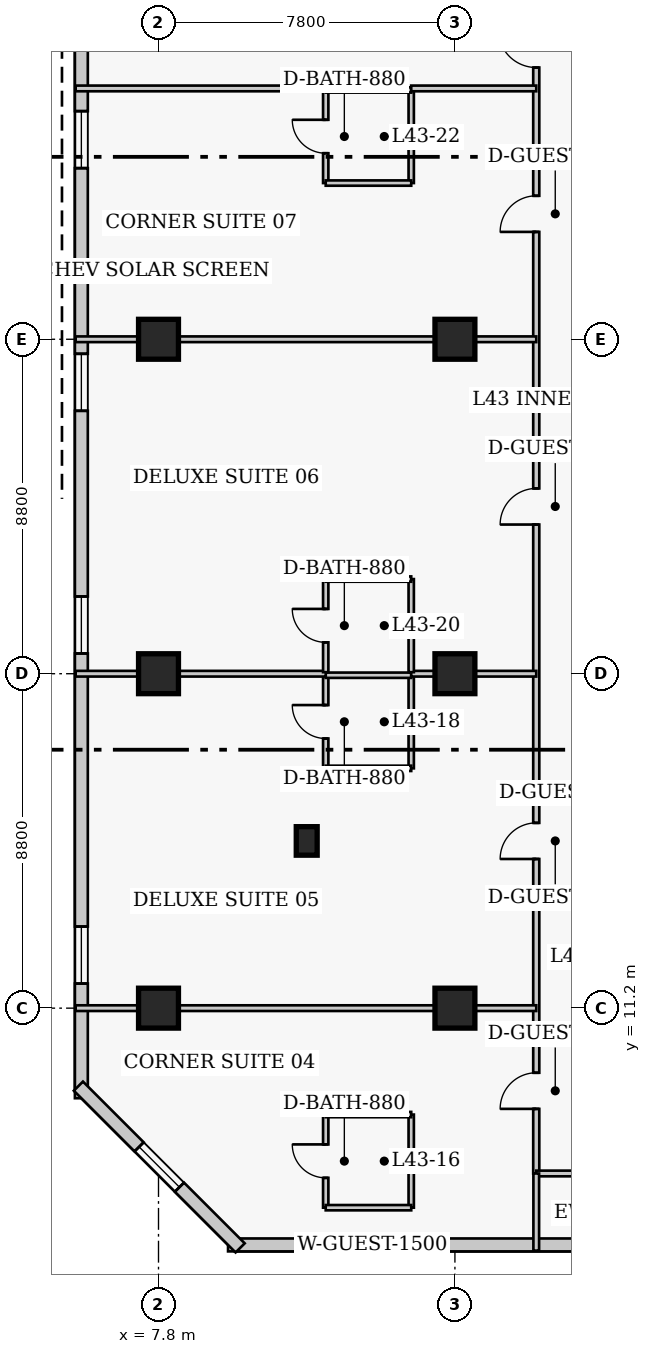
"""IFC4 building model, lengths in metres.
Left out: names, types, materials, properties, quantities, classifications, styles, units other than length and angle.
Written with IfcOpenShell. Run it as: python <this file> out.ifc"""

import sys

from ifc_helpers import new_model, si_unit, direction, frame, frame_2d, origin, origin_2d, place, context, subcontext, project, spatial, rectangle, extrude, element, fill, save


model = new_model("IFC4")
c1 = context("Model", 3, precision=1e-05, world=origin(), true_north=direction((0.0, 1.0)))
c2 = subcontext(c1, "Body", "Model", "MODEL_VIEW")
j1 = project(units=[si_unit("LENGTHUNIT", "METRE"), si_unit("PLANEANGLEUNIT", "RADIAN")], contexts=[c1])
p1 = place(None, origin())
s1 = spatial("IfcSite", under=j1, at=p1, CompositionType="ELEMENT")
p2 = place(p1, origin())
s2 = spatial("IfcBuilding", under=s1, at=p2, CompositionType="ELEMENT")
p3 = place(p2, frame((0.0, 0.0, 172.6)))
s3 = spatial("IfcBuildingStorey", under=s2, at=p3, CompositionType="ELEMENT", Elevation=172.6)
for number, where, z_axis, x_axis in (
    (1, (7.8, 11.2, 0.0), (0.0, 0.0, 1.0), (1.0, 0.0, 0.0)),
    (2, (7.8, 20.0, 0.0), (0.0, 0.0, 1.0), (1.0, 0.0, 0.0)),
    (3, (7.8, 28.8, 0.0), (0.0, 0.0, 1.0), (1.0, 0.0, 0.0)),
    (4, (15.6, 11.2, 0.0), (0.0, 0.0, 1.0), (1.0, 0.0, 0.0)),
    (5, (15.6, 20.0, 0.0), (0.0, 0.0, 1.0), (1.0, 0.0, 0.0)),
    (6, (15.6, 28.8, 0.0), (0.0, 0.0, 1.0), (1.0, 0.0, 0.0)),
):
    element("IfcColumn", number, at=place(p3, frame(where, z_axis=z_axis, x_axis=x_axis)), inside=s3, PredefinedType="COLUMN", context=c2, shape_type="SweptSolid", body=[
        extrude(rectangle(XDim=1.05, YDim=1.05, at=origin_2d()), origin(), (0.0, 0.0, 1.0), 3.8),
    ])
p4 = place(p3, frame((11.7, 15.6, 0.0), z_axis=(0.0, 0.0, 1.0), x_axis=(1.0, 0.0, 0.0)))
e7 = element("IfcColumn", 7, at=p4, inside=s3, PredefinedType="PILASTER", context=c2, shape_type="SweptSolid", body=[
    extrude(rectangle(XDim=0.55, YDim=0.75, at=origin_2d()), origin(), (0.0, 0.0, 1.0), 3.8),
])
p5 = place(p3, frame((9.63, 4.97, 0.0), z_axis=(0.0, 0.0, 1.0), x_axis=(1.0, 0.0, 0.0)))
e8 = element("IfcWall", 8, at=p5, inside=s3, PredefinedType="SOLIDWALL", context=c2, shape_type="SweptSolid", body=[
    extrude(rectangle(XDim=26.69, YDim=0.34, at=frame_2d((13.345, 0.0))), origin(), (0.0, 0.0, 1.0), 3.55),
])
p6 = place(p5, frame((3.048, 0.0, 0.85)))
e9 = element("IfcOpeningElement", 9, at=p6, cuts=e8, PredefinedType="OPENING", context=c2, shape_type="SweptSolid", body=[
    extrude(rectangle(XDim=1.5, YDim=1.75, at=frame_2d((0.75, 0.875))), frame((0.0, 0.18, 0.0), z_axis=(0.0, -1.0, 0.0), x_axis=(1.0, 0.0, 0.0)), (0.0, 0.0, 1.0), 0.36),
])
p7 = place(p5, frame((22.642, 0.0, 0.85)))
e10 = element("IfcOpeningElement", 10, at=p7, cuts=e8, PredefinedType="OPENING", context=c2, shape_type="SweptSolid", body=[
    extrude(rectangle(XDim=1.5, YDim=1.75, at=frame_2d((0.75, 0.875))), frame((0.0, 0.18, 0.0), z_axis=(0.0, -1.0, 0.0), x_axis=(1.0, 0.0, 0.0)), (0.0, 0.0, 1.0), 0.36),
])
p8 = place(p5, frame((16.27, 0.0, 0.0)))
e11 = element("IfcOpeningElement", 11, at=p8, cuts=e8, PredefinedType="OPENING", context=c2, shape_type="SweptSolid", body=[
    extrude(rectangle(XDim=1.2, YDim=2.1, at=frame_2d((0.6, 1.05))), frame((0.0, 0.18, 0.0), z_axis=(0.0, -1.0, 0.0), x_axis=(1.0, 0.0, 0.0)), (0.0, 0.0, 1.0), 0.36),
])
p9 = place(p3, frame((5.77, 38.97, 0.0), z_axis=(0.0, 0.0, 1.0), x_axis=(0.0, -1.0, 0.0)))
e12 = element("IfcWall", 12, at=p9, inside=s3, PredefinedType="SOLIDWALL", context=c2, shape_type="SweptSolid", body=[
    extrude(rectangle(XDim=30.14, YDim=0.34, at=frame_2d((15.07, 0.0))), origin(), (0.0, 0.0, 1.0), 3.55),
])
p10 = place(p9, frame((4.167, 0.0, 0.85)))
e13 = element("IfcOpeningElement", 13, at=p10, cuts=e12, PredefinedType="OPENING", context=c2, shape_type="SweptSolid", body=[
    extrude(rectangle(XDim=1.5, YDim=1.75, at=frame_2d((0.75, 0.875))), frame((0.0, 0.18, 0.0), z_axis=(0.0, -1.0, 0.0), x_axis=(1.0, 0.0, 0.0)), (0.0, 0.0, 1.0), 0.36),
])
p11 = place(p9, frame((10.552, 0.0, 0.85)))
e14 = element("IfcOpeningElement", 14, at=p11, cuts=e12, PredefinedType="OPENING", context=c2, shape_type="SweptSolid", body=[
    extrude(rectangle(XDim=1.5, YDim=1.75, at=frame_2d((0.75, 0.875))), frame((0.0, 0.18, 0.0), z_axis=(0.0, -1.0, 0.0), x_axis=(1.0, 0.0, 0.0)), (0.0, 0.0, 1.0), 0.36),
])
p12 = place(p9, frame((16.938, 0.0, 0.85)))
e15 = element("IfcOpeningElement", 15, at=p12, cuts=e12, PredefinedType="OPENING", context=c2, shape_type="SweptSolid", body=[
    extrude(rectangle(XDim=1.5, YDim=1.75, at=frame_2d((0.75, 0.875))), frame((0.0, 0.18, 0.0), z_axis=(0.0, -1.0, 0.0), x_axis=(1.0, 0.0, 0.0)), (0.0, 0.0, 1.0), 0.36),
])
p13 = place(p9, frame((25.623, 0.0, 0.85)))
e16 = element("IfcOpeningElement", 16, at=p13, cuts=e12, PredefinedType="OPENING", context=c2, shape_type="SweptSolid", body=[
    extrude(rectangle(XDim=1.5, YDim=1.75, at=frame_2d((0.75, 0.875))), frame((0.0, 0.18, 0.0), z_axis=(0.0, -1.0, 0.0), x_axis=(1.0, 0.0, 0.0)), (0.0, 0.0, 1.0), 0.36),
])
p14 = place(p3, frame((5.692, 9.148, 0.0), z_axis=(0.0, 0.0, 1.0), x_axis=(0.707106781187, -0.707106781187, 0.0)))
e17 = element("IfcWall", 17, at=p14, inside=s3, PredefinedType="SOLIDWALL", context=c2, shape_type="SweptSolid", body=[
    extrude(rectangle(XDim=6.02, YDim=0.34, at=frame_2d((3.01, 0.0))), origin(), (0.0, 0.0, 1.0), 3.55),
])
p15 = place(p14, frame((2.26, 0.0, 0.85)))
e18 = element("IfcOpeningElement", 18, at=p15, cuts=e17, PredefinedType="OPENING", context=c2, shape_type="SweptSolid", body=[
    extrude(rectangle(XDim=1.5, YDim=1.75, at=frame_2d((0.75, 0.875))), frame((0.0, 0.18, 0.0), z_axis=(0.0, -1.0, 0.0), x_axis=(1.0, 0.0, 0.0)), (0.0, 0.0, 1.0), 0.36),
])
p16 = place(p3, frame((17.74, 6.85, 0.0), z_axis=(0.0, 0.0, 1.0), x_axis=(0.0, 1.0, 0.0)))
e19 = element("IfcWall", 19, at=p16, inside=s3, PredefinedType="PARTITIONING", context=c2, shape_type="SweptSolid", body=[
    extrude(rectangle(XDim=33.8, YDim=0.16, at=frame_2d((16.9, 0.0))), origin(), (0.0, 0.0, 1.0), 3.55),
])
p17 = place(p16, frame((1.7, 0.0, 0.0)))
e20 = element("IfcOpeningElement", 20, at=p17, cuts=e19, PredefinedType="OPENING", context=c2, shape_type="SweptSolid", body=[
    extrude(rectangle(XDim=0.95, YDim=2.1, at=frame_2d((0.475, 1.05))), frame((0.0, 0.09, 0.0), z_axis=(0.0, -1.0, 0.0), x_axis=(1.0, 0.0, 0.0)), (0.0, 0.0, 1.0), 0.18),
])
p18 = place(p16, frame((8.275, 0.0, 0.0)))
e21 = element("IfcOpeningElement", 21, at=p18, cuts=e19, PredefinedType="OPENING", context=c2, shape_type="SweptSolid", body=[
    extrude(rectangle(XDim=0.95, YDim=2.1, at=frame_2d((0.475, 1.05))), frame((0.0, 0.09, 0.0), z_axis=(0.0, -1.0, 0.0), x_axis=(1.0, 0.0, 0.0)), (0.0, 0.0, 1.0), 0.18),
])
p19 = place(p16, frame((17.075, 0.0, 0.0)))
e22 = element("IfcOpeningElement", 22, at=p19, cuts=e19, PredefinedType="OPENING", context=c2, shape_type="SweptSolid", body=[
    extrude(rectangle(XDim=0.95, YDim=2.1, at=frame_2d((0.475, 1.05))), frame((0.0, 0.09, 0.0), z_axis=(0.0, -1.0, 0.0), x_axis=(1.0, 0.0, 0.0)), (0.0, 0.0, 1.0), 0.18),
])
p20 = place(p16, frame((24.775, 0.0, 0.0)))
e23 = element("IfcOpeningElement", 23, at=p20, cuts=e19, PredefinedType="OPENING", context=c2, shape_type="SweptSolid", body=[
    extrude(rectangle(XDim=0.95, YDim=2.1, at=frame_2d((0.475, 1.05))), frame((0.0, 0.09, 0.0), z_axis=(0.0, -1.0, 0.0), x_axis=(1.0, 0.0, 0.0)), (0.0, 0.0, 1.0), 0.18),
])
p21 = place(p16, frame((29.1, 0.0, 0.0)))
e24 = element("IfcOpeningElement", 24, at=p21, cuts=e19, PredefinedType="OPENING", context=c2, shape_type="SweptSolid", body=[
    extrude(rectangle(XDim=1.0, YDim=2.15, at=frame_2d((0.5, 1.075))), frame((0.0, 0.09, 0.0), z_axis=(0.0, -1.0, 0.0), x_axis=(1.0, 0.0, 0.0)), (0.0, 0.0, 1.0), 0.18),
])
p22 = place(p3, frame((17.74, 6.85, 0.0), z_axis=(0.0, 0.0, 1.0), x_axis=(1.0, 0.0, 0.0)))
e25 = element("IfcWall", 25, at=p22, inside=s3, PredefinedType="PARTITIONING", context=c2, shape_type="SweptSolid", body=[
    extrude(rectangle(XDim=2.22, YDim=0.15, at=frame_2d((1.11, 0.0))), origin(), (0.0, 0.0, 1.0), 3.55),
])
p23 = place(p3, frame((17.74, 4.82, 0.0), z_axis=(0.0, 0.0, 1.0), x_axis=(0.0, 1.0, 0.0)))
e26 = element("IfcWall", 26, at=p23, inside=s3, PredefinedType="PARTITIONING", context=c2, shape_type="SweptSolid", body=[
    extrude(rectangle(XDim=2.03, YDim=0.15, at=frame_2d((1.015, 0.0))), origin(), (0.0, 0.0, 1.0), 3.55),
])
p24 = place(p3, frame((12.2, 5.95, 0.0), z_axis=(0.0, 0.0, 1.0), x_axis=(0.0, 1.0, 0.0)))
e27 = element("IfcWall", 27, at=p24, inside=s3, PredefinedType="PLUMBINGWALL", context=c2, shape_type="SweptSolid", body=[
    extrude(rectangle(XDim=2.45, YDim=0.14, at=frame_2d((1.225, 0.0))), origin(), (0.0, 0.0, 1.0), 3.55),
])
p25 = place(p24, frame((0.785, 0.0, 0.0)))
e28 = element("IfcOpeningElement", 28, at=p25, cuts=e27, PredefinedType="OPENING", context=c2, shape_type="SweptSolid", body=[
    extrude(rectangle(XDim=0.88, YDim=2.05, at=frame_2d((0.44, 1.025))), frame((0.0, 0.08, 0.0), z_axis=(0.0, -1.0, 0.0), x_axis=(1.0, 0.0, 0.0)), (0.0, 0.0, 1.0), 0.16),
])
p26 = place(p3, frame((14.45, 5.95, 0.0), z_axis=(0.0, 0.0, 1.0), x_axis=(0.0, 1.0, 0.0)))
e29 = element("IfcWall", 29, at=p26, inside=s3, PredefinedType="PLUMBINGWALL", context=c2, shape_type="SweptSolid", body=[
    extrude(rectangle(XDim=2.45, YDim=0.14, at=frame_2d((1.225, 0.0))), origin(), (0.0, 0.0, 1.0), 3.55),
])
for number, where, z_axis, x_axis in (
    (30, (12.2, 5.95, 0.0), (0.0, 0.0, 1.0), (1.0, 0.0, 0.0)),
    (31, (12.2, 8.4, 0.0), (0.0, 0.0, 1.0), (1.0, 0.0, 0.0)),
):
    element("IfcWall", number, at=place(p3, frame(where, z_axis=z_axis, x_axis=x_axis)), inside=s3, PredefinedType="PLUMBINGWALL", context=c2, shape_type="SweptSolid", body=[
        extrude(rectangle(XDim=2.25, YDim=0.14, at=frame_2d((1.125, 0.0))), origin(), (0.0, 0.0, 1.0), 3.55),
    ])
p27 = place(p3, frame((5.62, 11.2, 0.0), z_axis=(0.0, 0.0, 1.0), x_axis=(1.0, 0.0, 0.0)))
e32 = element("IfcWall", 32, at=p27, inside=s3, PredefinedType="PARTITIONING", context=c2, shape_type="SweptSolid", body=[
    extrude(rectangle(XDim=12.12, YDim=0.15, at=frame_2d((6.06, 0.0))), origin(), (0.0, 0.0, 1.0), 2.778),
])
p28 = place(p3, frame((12.2, 17.51, 0.0), z_axis=(0.0, 0.0, 1.0), x_axis=(0.0, 1.0, 0.0)))
e33 = element("IfcWall", 33, at=p28, inside=s3, PredefinedType="PLUMBINGWALL", context=c2, shape_type="SweptSolid", body=[
    extrude(rectangle(XDim=2.45, YDim=0.14, at=frame_2d((1.225, 0.0))), origin(), (0.0, 0.0, 1.0), 3.55),
])
p29 = place(p28, frame((0.785, 0.0, 0.0)))
e34 = element("IfcOpeningElement", 34, at=p29, cuts=e33, PredefinedType="OPENING", context=c2, shape_type="SweptSolid", body=[
    extrude(rectangle(XDim=0.88, YDim=2.05, at=frame_2d((0.44, 1.025))), frame((0.0, 0.08, 0.0), z_axis=(0.0, -1.0, 0.0), x_axis=(1.0, 0.0, 0.0)), (0.0, 0.0, 1.0), 0.16),
])
p30 = place(p3, frame((14.45, 17.51, 0.0), z_axis=(0.0, 0.0, 1.0), x_axis=(0.0, 1.0, 0.0)))
e35 = element("IfcWall", 35, at=p30, inside=s3, PredefinedType="PLUMBINGWALL", context=c2, shape_type="SweptSolid", body=[
    extrude(rectangle(XDim=2.45, YDim=0.14, at=frame_2d((1.225, 0.0))), origin(), (0.0, 0.0, 1.0), 3.55),
])
p31 = place(p3, frame((12.2, 17.51, 0.0), z_axis=(0.0, 0.0, 1.0), x_axis=(1.0, 0.0, 0.0)))
e36 = element("IfcWall", 36, at=p31, inside=s3, PredefinedType="PLUMBINGWALL", context=c2, shape_type="SweptSolid", body=[
    extrude(rectangle(XDim=2.25, YDim=0.14, at=frame_2d((1.125, 0.0))), origin(), (0.0, 0.0, 1.0), 3.55),
])
p32 = place(p3, frame((12.2, 19.96, 0.0), z_axis=(0.0, 0.0, 1.0), x_axis=(1.0, 0.0, 0.0)))
e37 = element("IfcWall", 37, at=p32, inside=s3, PredefinedType="PLUMBINGWALL", context=c2, shape_type="SweptSolid", body=[
    extrude(rectangle(XDim=2.25, YDim=0.14, at=frame_2d((1.125, 0.0))), origin(), (0.0, 0.0, 1.0), 2.9),
])
p33 = place(p3, frame((5.62, 20.0, 0.0), z_axis=(0.0, 0.0, 1.0), x_axis=(1.0, 0.0, 0.0)))
e38 = element("IfcWall", 38, at=p33, inside=s3, PredefinedType="PARTITIONING", context=c2, shape_type="SweptSolid", body=[
    extrude(rectangle(XDim=6.58, YDim=0.15, at=frame_2d((3.29, 0.0))), origin(), (0.0, 0.0, 1.0), 2.778),
])
p34 = place(p3, frame((14.45, 20.0, 0.0), z_axis=(0.0, 0.0, 1.0), x_axis=(1.0, 0.0, 0.0)))
e39 = element("IfcWall", 39, at=p34, inside=s3, PredefinedType="PARTITIONING", context=c2, shape_type="SweptSolid", body=[
    extrude(rectangle(XDim=3.29, YDim=0.15, at=frame_2d((1.645, 0.0))), origin(), (0.0, 0.0, 1.0), 2.778),
])
p35 = place(p3, frame((12.2, 20.04, 0.0), z_axis=(0.0, 0.0, 1.0), x_axis=(0.0, 1.0, 0.0)))
e40 = element("IfcWall", 40, at=p35, inside=s3, PredefinedType="PLUMBINGWALL", context=c2, shape_type="SweptSolid", body=[
    extrude(rectangle(XDim=2.45, YDim=0.14, at=frame_2d((1.225, 0.0))), origin(), (0.0, 0.0, 1.0), 3.55),
])
p36 = place(p35, frame((0.785, 0.0, 0.0)))
e41 = element("IfcOpeningElement", 41, at=p36, cuts=e40, PredefinedType="OPENING", context=c2, shape_type="SweptSolid", body=[
    extrude(rectangle(XDim=0.88, YDim=2.05, at=frame_2d((0.44, 1.025))), frame((0.0, 0.08, 0.0), z_axis=(0.0, -1.0, 0.0), x_axis=(1.0, 0.0, 0.0)), (0.0, 0.0, 1.0), 0.16),
])
p37 = place(p3, frame((14.45, 20.04, 0.0), z_axis=(0.0, 0.0, 1.0), x_axis=(0.0, 1.0, 0.0)))
e42 = element("IfcWall", 42, at=p37, inside=s3, PredefinedType="PLUMBINGWALL", context=c2, shape_type="SweptSolid", body=[
    extrude(rectangle(XDim=2.45, YDim=0.14, at=frame_2d((1.225, 0.0))), origin(), (0.0, 0.0, 1.0), 3.55),
])
p38 = place(p3, frame((12.2, 22.49, 0.0), z_axis=(0.0, 0.0, 1.0), x_axis=(1.0, 0.0, 0.0)))
e43 = element("IfcWall", 43, at=p38, inside=s3, PredefinedType="PLUMBINGWALL", context=c2, shape_type="SweptSolid", body=[
    extrude(rectangle(XDim=2.25, YDim=0.14, at=frame_2d((1.125, 0.0))), origin(), (0.0, 0.0, 1.0), 3.55),
])
p39 = place(p3, frame((5.62, 28.8, 0.0), z_axis=(0.0, 0.0, 1.0), x_axis=(1.0, 0.0, 0.0)))
e44 = element("IfcWall", 44, at=p39, inside=s3, PredefinedType="PARTITIONING", context=c2, shape_type="SweptSolid", body=[
    extrude(rectangle(XDim=12.12, YDim=0.15, at=frame_2d((6.06, 0.0))), origin(), (0.0, 0.0, 1.0), 2.778),
])
p40 = place(p3, frame((12.2, 32.91, 0.0), z_axis=(0.0, 0.0, 1.0), x_axis=(0.0, 1.0, 0.0)))
e45 = element("IfcWall", 45, at=p40, inside=s3, PredefinedType="PLUMBINGWALL", context=c2, shape_type="SweptSolid", body=[
    extrude(rectangle(XDim=2.45, YDim=0.14, at=frame_2d((1.225, 0.0))), origin(), (0.0, 0.0, 1.0), 3.55),
])
p41 = place(p40, frame((0.785, 0.0, 0.0)))
e46 = element("IfcOpeningElement", 46, at=p41, cuts=e45, PredefinedType="OPENING", context=c2, shape_type="SweptSolid", body=[
    extrude(rectangle(XDim=0.88, YDim=2.05, at=frame_2d((0.44, 1.025))), frame((0.0, 0.08, 0.0), z_axis=(0.0, -1.0, 0.0), x_axis=(1.0, 0.0, 0.0)), (0.0, 0.0, 1.0), 0.16),
])
p42 = place(p3, frame((14.45, 32.91, 0.0), z_axis=(0.0, 0.0, 1.0), x_axis=(0.0, 1.0, 0.0)))
e47 = element("IfcWall", 47, at=p42, inside=s3, PredefinedType="PLUMBINGWALL", context=c2, shape_type="SweptSolid", body=[
    extrude(rectangle(XDim=2.45, YDim=0.14, at=frame_2d((1.225, 0.0))), origin(), (0.0, 0.0, 1.0), 3.55),
])
for number, where, z_axis, x_axis in (
    (48, (12.2, 32.91, 0.0), (0.0, 0.0, 1.0), (1.0, 0.0, 0.0)),
    (49, (12.2, 35.36, 0.0), (0.0, 0.0, 1.0), (1.0, 0.0, 0.0)),
):
    element("IfcWall", number, at=place(p3, frame(where, z_axis=z_axis, x_axis=x_axis)), inside=s3, PredefinedType="PLUMBINGWALL", context=c2, shape_type="SweptSolid", body=[
        extrude(rectangle(XDim=2.25, YDim=0.14, at=frame_2d((1.125, 0.0))), origin(), (0.0, 0.0, 1.0), 3.55),
    ])
p43 = place(p3, frame((5.62, 35.4, 0.0), z_axis=(0.0, 0.0, 1.0), x_axis=(1.0, 0.0, 0.0)))
e50 = element("IfcWall", 50, at=p43, inside=s3, PredefinedType="PARTITIONING", context=c2, shape_type="SweptSolid", body=[
    extrude(rectangle(XDim=6.58, YDim=0.15, at=frame_2d((3.29, 0.0))), origin(), (0.0, 0.0, 1.0), 3.55),
])
p44 = place(p3, frame((14.45, 35.4, 0.0), z_axis=(0.0, 0.0, 1.0), x_axis=(1.0, 0.0, 0.0)))
e51 = element("IfcWall", 51, at=p44, inside=s3, PredefinedType="PARTITIONING", context=c2, shape_type="SweptSolid", body=[
    extrude(rectangle(XDim=3.29, YDim=0.15, at=frame_2d((1.645, 0.0))), origin(), (0.0, 0.0, 1.0), 3.55),
])
p45 = place(p6, origin())
e52 = element("IfcWindow", 52, at=p45, inside=s3, PartitioningType="SINGLE_PANEL", PredefinedType="WINDOW", context=c2, shape_type="SweptSolid", body=[
    extrude(rectangle(XDim=1.5, YDim=1.75, at=frame_2d((0.75, 0.875))), frame((0.0, 0.03, 0.0), z_axis=(0.0, -1.0, 0.0), x_axis=(1.0, 0.0, 0.0)), (0.0, 0.0, 1.0), 0.06),
])
fill(e9, e52)
p46 = place(p10, origin())
e53 = element("IfcWindow", 53, at=p46, inside=s3, PartitioningType="SINGLE_PANEL", PredefinedType="WINDOW", context=c2, shape_type="SweptSolid", body=[
    extrude(rectangle(XDim=1.5, YDim=1.75, at=frame_2d((0.75, 0.875))), frame((0.0, 0.03, 0.0), z_axis=(0.0, -1.0, 0.0), x_axis=(1.0, 0.0, 0.0)), (0.0, 0.0, 1.0), 0.06),
])
fill(e13, e53)
p47 = place(p11, origin())
e54 = element("IfcWindow", 54, at=p47, inside=s3, PartitioningType="SINGLE_PANEL", PredefinedType="WINDOW", context=c2, shape_type="SweptSolid", body=[
    extrude(rectangle(XDim=1.5, YDim=1.75, at=frame_2d((0.75, 0.875))), frame((0.0, 0.03, 0.0), z_axis=(0.0, -1.0, 0.0), x_axis=(1.0, 0.0, 0.0)), (0.0, 0.0, 1.0), 0.06),
])
fill(e14, e54)
p48 = place(p12, origin())
e55 = element("IfcWindow", 55, at=p48, inside=s3, PartitioningType="SINGLE_PANEL", PredefinedType="WINDOW", context=c2, shape_type="SweptSolid", body=[
    extrude(rectangle(XDim=1.5, YDim=1.75, at=frame_2d((0.75, 0.875))), frame((0.0, 0.03, 0.0), z_axis=(0.0, -1.0, 0.0), x_axis=(1.0, 0.0, 0.0)), (0.0, 0.0, 1.0), 0.06),
])
fill(e15, e55)
p49 = place(p13, origin())
e56 = element("IfcWindow", 56, at=p49, inside=s3, PartitioningType="SINGLE_PANEL", PredefinedType="WINDOW", context=c2, shape_type="SweptSolid", body=[
    extrude(rectangle(XDim=1.5, YDim=1.75, at=frame_2d((0.75, 0.875))), frame((0.0, 0.03, 0.0), z_axis=(0.0, -1.0, 0.0), x_axis=(1.0, 0.0, 0.0)), (0.0, 0.0, 1.0), 0.06),
])
fill(e16, e56)
p50 = place(p15, origin())
e57 = element("IfcWindow", 57, at=p50, inside=s3, PartitioningType="SINGLE_PANEL", PredefinedType="WINDOW", context=c2, shape_type="SweptSolid", body=[
    extrude(rectangle(XDim=1.5, YDim=1.75, at=frame_2d((0.75, 0.875))), frame((0.0, 0.03, 0.0), z_axis=(0.0, -1.0, 0.0), x_axis=(1.0, 0.0, 0.0)), (0.0, 0.0, 1.0), 0.06),
])
fill(e18, e57)
p51 = place(p25, origin())
e58 = element("IfcDoor", 58, at=p51, inside=s3, OperationType="SINGLE_SWING_RIGHT", PredefinedType="DOOR", context=c2, shape_type="SweptSolid", body=[
    extrude(rectangle(XDim=0.88, YDim=2.05, at=frame_2d((0.44, 1.025))), frame((0.0, 0.025, 0.0), z_axis=(0.0, -1.0, 0.0), x_axis=(1.0, 0.0, 0.0)), (0.0, 0.0, 1.0), 0.05),
])
fill(e28, e58)
p52 = place(p17, origin())
e59 = element("IfcDoor", 59, at=p52, inside=s3, OperationType="SINGLE_SWING_LEFT", PredefinedType="DOOR", context=c2, shape_type="SweptSolid", body=[
    extrude(rectangle(XDim=0.95, YDim=2.1, at=frame_2d((0.475, 1.05))), frame((0.0, 0.025, 0.0), z_axis=(0.0, -1.0, 0.0), x_axis=(1.0, 0.0, 0.0)), (0.0, 0.0, 1.0), 0.05),
])
fill(e20, e59)
p53 = place(p29, origin())
e60 = element("IfcDoor", 60, at=p53, inside=s3, OperationType="SINGLE_SWING_RIGHT", PredefinedType="DOOR", context=c2, shape_type="SweptSolid", body=[
    extrude(rectangle(XDim=0.88, YDim=2.05, at=frame_2d((0.44, 1.025))), frame((0.0, 0.025, 0.0), z_axis=(0.0, -1.0, 0.0), x_axis=(1.0, 0.0, 0.0)), (0.0, 0.0, 1.0), 0.05),
])
fill(e34, e60)
p54 = place(p18, origin())
e61 = element("IfcDoor", 61, at=p54, inside=s3, OperationType="SINGLE_SWING_LEFT", PredefinedType="DOOR", context=c2, shape_type="SweptSolid", body=[
    extrude(rectangle(XDim=0.95, YDim=2.1, at=frame_2d((0.475, 1.05))), frame((0.0, 0.025, 0.0), z_axis=(0.0, -1.0, 0.0), x_axis=(1.0, 0.0, 0.0)), (0.0, 0.0, 1.0), 0.05),
])
fill(e21, e61)
p55 = place(p36, origin())
e62 = element("IfcDoor", 62, at=p55, inside=s3, OperationType="SINGLE_SWING_RIGHT", PredefinedType="DOOR", context=c2, shape_type="SweptSolid", body=[
    extrude(rectangle(XDim=0.88, YDim=2.05, at=frame_2d((0.44, 1.025))), frame((0.0, 0.025, 0.0), z_axis=(0.0, -1.0, 0.0), x_axis=(1.0, 0.0, 0.0)), (0.0, 0.0, 1.0), 0.05),
])
fill(e41, e62)
p56 = place(p19, origin())
e63 = element("IfcDoor", 63, at=p56, inside=s3, OperationType="SINGLE_SWING_LEFT", PredefinedType="DOOR", context=c2, shape_type="SweptSolid", body=[
    extrude(rectangle(XDim=0.95, YDim=2.1, at=frame_2d((0.475, 1.05))), frame((0.0, 0.025, 0.0), z_axis=(0.0, -1.0, 0.0), x_axis=(1.0, 0.0, 0.0)), (0.0, 0.0, 1.0), 0.05),
])
fill(e22, e63)
p57 = place(p41, origin())
e64 = element("IfcDoor", 64, at=p57, inside=s3, OperationType="SINGLE_SWING_RIGHT", PredefinedType="DOOR", context=c2, shape_type="SweptSolid", body=[
    extrude(rectangle(XDim=0.88, YDim=2.05, at=frame_2d((0.44, 1.025))), frame((0.0, 0.025, 0.0), z_axis=(0.0, -1.0, 0.0), x_axis=(1.0, 0.0, 0.0)), (0.0, 0.0, 1.0), 0.05),
])
fill(e46, e64)
p58 = place(p20, origin())
e65 = element("IfcDoor", 65, at=p58, inside=s3, OperationType="SINGLE_SWING_LEFT", PredefinedType="DOOR", context=c2, shape_type="SweptSolid", body=[
    extrude(rectangle(XDim=0.95, YDim=2.1, at=frame_2d((0.475, 1.05))), frame((0.0, 0.025, 0.0), z_axis=(0.0, -1.0, 0.0), x_axis=(1.0, 0.0, 0.0)), (0.0, 0.0, 1.0), 0.05),
])
fill(e23, e65)
p59 = place(p21, origin())
e66 = element("IfcDoor", 66, at=p59, inside=s3, OperationType="SINGLE_SWING_RIGHT", PredefinedType="DOOR", context=c2, shape_type="SweptSolid", body=[
    extrude(rectangle(XDim=1.0, YDim=2.15, at=frame_2d((0.5, 1.075))), frame((0.0, 0.025, 0.0), z_axis=(0.0, -1.0, 0.0), x_axis=(1.0, 0.0, 0.0)), (0.0, 0.0, 1.0), 0.05),
])
fill(e24, e66)
save(model, sys.argv[1])
